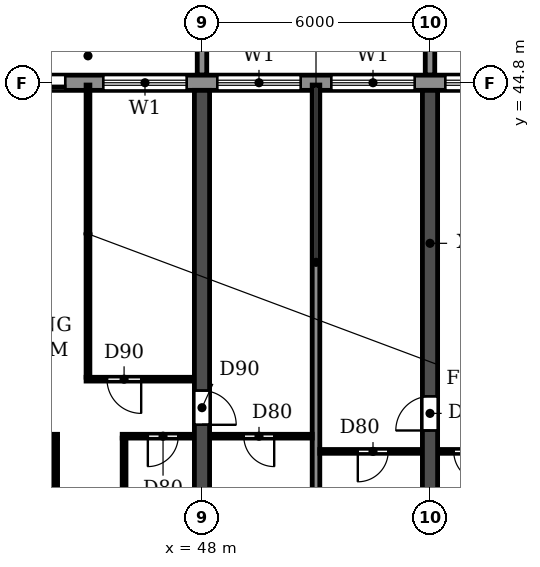
"""IFC4 building model, lengths in metres.
Left out: names, types, materials, properties, quantities, classifications, styles, units other than length and angle.
Written with IfcOpenShell. Run it as: python <this file> out.ifc"""

import sys

from ifc_helpers import new_model, si_unit, direction, frame, frame_2d, origin, place, context, subcontext, project, spatial, polyline, rectangle, outline, extrude, source, transform, mapped, element, fill, save


model = new_model("IFC4")
c1 = context("Model", 3, precision=1e-05, world=origin(), true_north=direction((0.0, 1.0)))
c2 = subcontext(c1, "Body", "Model", "MODEL_VIEW")
j1 = project(units=[si_unit("LENGTHUNIT", "METRE"), si_unit("PLANEANGLEUNIT", "RADIAN")], contexts=[c1])
p1 = place(None, origin())
s1 = spatial("IfcSite", under=j1, at=p1, CompositionType="ELEMENT")
p2 = place(p1, origin())
s2 = spatial("IfcBuilding", under=s1, at=p2, CompositionType="ELEMENT")
p3 = place(p2, frame((0.0, 0.0, 63.0)))
s3 = spatial("IfcBuildingStorey", under=s2, at=p3, CompositionType="ELEMENT", Elevation=63.0)
p4 = place(p3, frame((48.0, 30.55, 0.0), z_axis=(0.0, 0.0, 1.0), x_axis=(0.0, 1.0, 0.0)))
e1 = element("IfcWall", 1, at=p4, inside=s3, PredefinedType="SHEAR", context=c2, shape_type="SweptSolid", body=[
    extrude(rectangle(XDim=14.05, YDim=0.4, at=frame_2d((7.025, 0.0))), origin(), (0.0, 0.0, 1.0), 2.95),
])
p5 = place(p4, frame((5.25, 0.0, 0.0)))
e2 = element("IfcOpeningElement", 2, at=p5, cuts=e1, PredefinedType="OPENING", context=c2, shape_type="SweptSolid", body=[
    extrude(rectangle(XDim=0.9, YDim=2.1, at=frame_2d((0.45, 1.05))), frame((0.0, 0.21, 0.0), z_axis=(0.0, -1.0, 0.0), x_axis=(1.0, 0.0, 0.0)), (0.0, 0.0, 1.0), 0.42),
])
p6 = place(p3, frame((54.0, 30.55, 0.0), z_axis=(0.0, 0.0, 1.0), x_axis=(0.0, 1.0, 0.0)))
e3 = element("IfcWall", 3, at=p6, inside=s3, PredefinedType="SHEAR", context=c2, shape_type="SweptSolid", body=[
    extrude(rectangle(XDim=14.05, YDim=0.4, at=frame_2d((7.025, 0.0))), origin(), (0.0, 0.0, 1.0), 2.95),
])
p7 = place(p6, frame((5.1, 0.0, 0.0)))
e4 = element("IfcOpeningElement", 4, at=p7, cuts=e3, PredefinedType="OPENING", context=c2, shape_type="SweptSolid", body=[
    extrude(rectangle(XDim=0.9, YDim=2.1, at=frame_2d((0.45, 1.05))), frame((0.0, 0.21, 0.0), z_axis=(0.0, -1.0, 0.0), x_axis=(1.0, 0.0, 0.0)), (0.0, 0.0, 1.0), 0.42),
])
p8 = place(p3, frame((91.317, 44.8, 0.0), z_axis=(0.0, 0.0, 1.0), x_axis=(-1.0, 0.0, 0.0)))
e5 = element("IfcWall", 5, at=p8, inside=s3, PredefinedType="STANDARD", context=c2, shape_type="SweptSolid", body=[
    extrude(rectangle(XDim=80.634, YDim=0.4, at=frame_2d((40.317, 0.0))), origin(), (0.0, 0.0, 1.0), 2.95),
])
p9 = place(p8, frame((76.717, 0.0, 0.9)))
e6 = element("IfcOpeningElement", 6, at=p9, cuts=e5, PredefinedType="OPENING", context=c2, shape_type="SweptSolid", body=[
    extrude(rectangle(XDim=2.2, YDim=1.5, at=frame_2d((1.1, 0.75))), frame((0.0, 0.21, 0.0), z_axis=(0.0, -1.0, 0.0), x_axis=(1.0, 0.0, 0.0)), (0.0, 0.0, 1.0), 0.42),
])
p10 = place(p8, frame((73.917, 0.0, 0.0)))
e7 = element("IfcOpeningElement", 7, at=p10, cuts=e5, PredefinedType="OPENING", context=c2, shape_type="SweptSolid", body=[
    extrude(rectangle(XDim=1.8, YDim=2.4, at=frame_2d((0.9, 1.2))), frame((0.0, 0.21, 0.0), z_axis=(0.0, -1.0, 0.0), x_axis=(1.0, 0.0, 0.0)), (0.0, 0.0, 1.0), 0.42),
])
p11 = place(p8, frame((70.717, 0.0, 0.9)))
e8 = element("IfcOpeningElement", 8, at=p11, cuts=e5, PredefinedType="OPENING", context=c2, shape_type="SweptSolid", body=[
    extrude(rectangle(XDim=2.2, YDim=1.5, at=frame_2d((1.1, 0.75))), frame((0.0, 0.21, 0.0), z_axis=(0.0, -1.0, 0.0), x_axis=(1.0, 0.0, 0.0)), (0.0, 0.0, 1.0), 0.42),
])
p12 = place(p8, frame((67.917, 0.0, 0.0)))
e9 = element("IfcOpeningElement", 9, at=p12, cuts=e5, PredefinedType="OPENING", context=c2, shape_type="SweptSolid", body=[
    extrude(rectangle(XDim=1.8, YDim=2.4, at=frame_2d((0.9, 1.2))), frame((0.0, 0.21, 0.0), z_axis=(0.0, -1.0, 0.0), x_axis=(1.0, 0.0, 0.0)), (0.0, 0.0, 1.0), 0.42),
])
p13 = place(p8, frame((64.717, 0.0, 0.9)))
e10 = element("IfcOpeningElement", 10, at=p13, cuts=e5, PredefinedType="OPENING", context=c2, shape_type="SweptSolid", body=[
    extrude(rectangle(XDim=2.2, YDim=1.5, at=frame_2d((1.1, 0.75))), frame((0.0, 0.21, 0.0), z_axis=(0.0, -1.0, 0.0), x_axis=(1.0, 0.0, 0.0)), (0.0, 0.0, 1.0), 0.42),
])
p14 = place(p8, frame((61.917, 0.0, 0.0)))
e11 = element("IfcOpeningElement", 11, at=p14, cuts=e5, PredefinedType="OPENING", context=c2, shape_type="SweptSolid", body=[
    extrude(rectangle(XDim=1.8, YDim=2.4, at=frame_2d((0.9, 1.2))), frame((0.0, 0.21, 0.0), z_axis=(0.0, -1.0, 0.0), x_axis=(1.0, 0.0, 0.0)), (0.0, 0.0, 1.0), 0.42),
])
p15 = place(p8, frame((58.717, 0.0, 0.9)))
e12 = element("IfcOpeningElement", 12, at=p15, cuts=e5, PredefinedType="OPENING", context=c2, shape_type="SweptSolid", body=[
    extrude(rectangle(XDim=2.2, YDim=1.5, at=frame_2d((1.1, 0.75))), frame((0.0, 0.21, 0.0), z_axis=(0.0, -1.0, 0.0), x_axis=(1.0, 0.0, 0.0)), (0.0, 0.0, 1.0), 0.42),
])
p16 = place(p8, frame((55.717, 0.0, 0.9)))
e13 = element("IfcOpeningElement", 13, at=p16, cuts=e5, PredefinedType="OPENING", context=c2, shape_type="SweptSolid", body=[
    extrude(rectangle(XDim=2.2, YDim=1.5, at=frame_2d((1.1, 0.75))), frame((0.0, 0.21, 0.0), z_axis=(0.0, -1.0, 0.0), x_axis=(1.0, 0.0, 0.0)), (0.0, 0.0, 1.0), 0.42),
])
p17 = place(p8, frame((52.917, 0.0, 0.0)))
e14 = element("IfcOpeningElement", 14, at=p17, cuts=e5, PredefinedType="OPENING", context=c2, shape_type="SweptSolid", body=[
    extrude(rectangle(XDim=1.8, YDim=2.4, at=frame_2d((0.9, 1.2))), frame((0.0, 0.21, 0.0), z_axis=(0.0, -1.0, 0.0), x_axis=(1.0, 0.0, 0.0)), (0.0, 0.0, 1.0), 0.42),
])
p18 = place(p8, frame((49.717, 0.0, 0.9)))
e15 = element("IfcOpeningElement", 15, at=p18, cuts=e5, PredefinedType="OPENING", context=c2, shape_type="SweptSolid", body=[
    extrude(rectangle(XDim=2.2, YDim=1.5, at=frame_2d((1.1, 0.75))), frame((0.0, 0.21, 0.0), z_axis=(0.0, -1.0, 0.0), x_axis=(1.0, 0.0, 0.0)), (0.0, 0.0, 1.0), 0.42),
])
p19 = place(p8, frame((46.917, 0.0, 0.0)))
e16 = element("IfcOpeningElement", 16, at=p19, cuts=e5, PredefinedType="OPENING", context=c2, shape_type="SweptSolid", body=[
    extrude(rectangle(XDim=1.8, YDim=2.4, at=frame_2d((0.9, 1.2))), frame((0.0, 0.21, 0.0), z_axis=(0.0, -1.0, 0.0), x_axis=(1.0, 0.0, 0.0)), (0.0, 0.0, 1.0), 0.42),
])
p20 = place(p8, frame((43.717, 0.0, 0.9)))
e17 = element("IfcOpeningElement", 17, at=p20, cuts=e5, PredefinedType="OPENING", context=c2, shape_type="SweptSolid", body=[
    extrude(rectangle(XDim=2.2, YDim=1.5, at=frame_2d((1.1, 0.75))), frame((0.0, 0.21, 0.0), z_axis=(0.0, -1.0, 0.0), x_axis=(1.0, 0.0, 0.0)), (0.0, 0.0, 1.0), 0.42),
])
p21 = place(p8, frame((40.717, 0.0, 0.9)))
e18 = element("IfcOpeningElement", 18, at=p21, cuts=e5, PredefinedType="OPENING", context=c2, shape_type="SweptSolid", body=[
    extrude(rectangle(XDim=2.2, YDim=1.5, at=frame_2d((1.1, 0.75))), frame((0.0, 0.21, 0.0), z_axis=(0.0, -1.0, 0.0), x_axis=(1.0, 0.0, 0.0)), (0.0, 0.0, 1.0), 0.42),
])
p22 = place(p8, frame((37.717, 0.0, 0.9)))
e19 = element("IfcOpeningElement", 19, at=p22, cuts=e5, PredefinedType="OPENING", context=c2, shape_type="SweptSolid", body=[
    extrude(rectangle(XDim=2.2, YDim=1.5, at=frame_2d((1.1, 0.75))), frame((0.0, 0.21, 0.0), z_axis=(0.0, -1.0, 0.0), x_axis=(1.0, 0.0, 0.0)), (0.0, 0.0, 1.0), 0.42),
])
p23 = place(p8, frame((34.717, 0.0, 0.9)))
e20 = element("IfcOpeningElement", 20, at=p23, cuts=e5, PredefinedType="OPENING", context=c2, shape_type="SweptSolid", body=[
    extrude(rectangle(XDim=2.2, YDim=1.5, at=frame_2d((1.1, 0.75))), frame((0.0, 0.21, 0.0), z_axis=(0.0, -1.0, 0.0), x_axis=(1.0, 0.0, 0.0)), (0.0, 0.0, 1.0), 0.42),
])
p24 = place(p8, frame((31.917, 0.0, 0.0)))
e21 = element("IfcOpeningElement", 21, at=p24, cuts=e5, PredefinedType="OPENING", context=c2, shape_type="SweptSolid", body=[
    extrude(rectangle(XDim=1.8, YDim=2.4, at=frame_2d((0.9, 1.2))), frame((0.0, 0.21, 0.0), z_axis=(0.0, -1.0, 0.0), x_axis=(1.0, 0.0, 0.0)), (0.0, 0.0, 1.0), 0.42),
])
p25 = place(p8, frame((28.917, 0.0, 0.0)))
e22 = element("IfcOpeningElement", 22, at=p25, cuts=e5, PredefinedType="OPENING", context=c2, shape_type="SweptSolid", body=[
    extrude(rectangle(XDim=1.8, YDim=2.4, at=frame_2d((0.9, 1.2))), frame((0.0, 0.21, 0.0), z_axis=(0.0, -1.0, 0.0), x_axis=(1.0, 0.0, 0.0)), (0.0, 0.0, 1.0), 0.42),
])
p26 = place(p8, frame((25.717, 0.0, 0.9)))
e23 = element("IfcOpeningElement", 23, at=p26, cuts=e5, PredefinedType="OPENING", context=c2, shape_type="SweptSolid", body=[
    extrude(rectangle(XDim=2.2, YDim=1.5, at=frame_2d((1.1, 0.75))), frame((0.0, 0.21, 0.0), z_axis=(0.0, -1.0, 0.0), x_axis=(1.0, 0.0, 0.0)), (0.0, 0.0, 1.0), 0.42),
])
p27 = place(p8, frame((22.917, 0.0, 0.0)))
e24 = element("IfcOpeningElement", 24, at=p27, cuts=e5, PredefinedType="OPENING", context=c2, shape_type="SweptSolid", body=[
    extrude(rectangle(XDim=1.8, YDim=2.4, at=frame_2d((0.9, 1.2))), frame((0.0, 0.21, 0.0), z_axis=(0.0, -1.0, 0.0), x_axis=(1.0, 0.0, 0.0)), (0.0, 0.0, 1.0), 0.42),
])
p28 = place(p8, frame((19.717, 0.0, 0.9)))
e25 = element("IfcOpeningElement", 25, at=p28, cuts=e5, PredefinedType="OPENING", context=c2, shape_type="SweptSolid", body=[
    extrude(rectangle(XDim=2.2, YDim=1.5, at=frame_2d((1.1, 0.75))), frame((0.0, 0.21, 0.0), z_axis=(0.0, -1.0, 0.0), x_axis=(1.0, 0.0, 0.0)), (0.0, 0.0, 1.0), 0.42),
])
p29 = place(p8, frame((16.917, 0.0, 0.0)))
e26 = element("IfcOpeningElement", 26, at=p29, cuts=e5, PredefinedType="OPENING", context=c2, shape_type="SweptSolid", body=[
    extrude(rectangle(XDim=1.8, YDim=2.4, at=frame_2d((0.9, 1.2))), frame((0.0, 0.21, 0.0), z_axis=(0.0, -1.0, 0.0), x_axis=(1.0, 0.0, 0.0)), (0.0, 0.0, 1.0), 0.42),
])
p30 = place(p8, frame((13.717, 0.0, 0.9)))
e27 = element("IfcOpeningElement", 27, at=p30, cuts=e5, PredefinedType="OPENING", context=c2, shape_type="SweptSolid", body=[
    extrude(rectangle(XDim=2.2, YDim=1.5, at=frame_2d((1.1, 0.75))), frame((0.0, 0.21, 0.0), z_axis=(0.0, -1.0, 0.0), x_axis=(1.0, 0.0, 0.0)), (0.0, 0.0, 1.0), 0.42),
])
p31 = place(p8, frame((10.917, 0.0, 0.0)))
e28 = element("IfcOpeningElement", 28, at=p31, cuts=e5, PredefinedType="OPENING", context=c2, shape_type="SweptSolid", body=[
    extrude(rectangle(XDim=1.8, YDim=2.4, at=frame_2d((0.9, 1.2))), frame((0.0, 0.21, 0.0), z_axis=(0.0, -1.0, 0.0), x_axis=(1.0, 0.0, 0.0)), (0.0, 0.0, 1.0), 0.42),
])
p32 = place(p8, frame((7.717, 0.0, 0.9)))
e29 = element("IfcOpeningElement", 29, at=p32, cuts=e5, PredefinedType="OPENING", context=c2, shape_type="SweptSolid", body=[
    extrude(rectangle(XDim=2.2, YDim=1.5, at=frame_2d((1.1, 0.75))), frame((0.0, 0.21, 0.0), z_axis=(0.0, -1.0, 0.0), x_axis=(1.0, 0.0, 0.0)), (0.0, 0.0, 1.0), 0.42),
])
p33 = place(p8, frame((4.717, 0.0, 0.9)))
e30 = element("IfcOpeningElement", 30, at=p33, cuts=e5, PredefinedType="OPENING", context=c2, shape_type="SweptSolid", body=[
    extrude(rectangle(XDim=2.2, YDim=1.5, at=frame_2d((1.1, 0.75))), frame((0.0, 0.21, 0.0), z_axis=(0.0, -1.0, 0.0), x_axis=(1.0, 0.0, 0.0)), (0.0, 0.0, 1.0), 0.42),
])
p34 = place(p8, frame((1.717, 0.0, 0.9)))
e31 = element("IfcOpeningElement", 31, at=p34, cuts=e5, PredefinedType="OPENING", context=c2, shape_type="SweptSolid", body=[
    extrude(rectangle(XDim=2.2, YDim=1.5, at=frame_2d((1.1, 0.75))), frame((0.0, 0.21, 0.0), z_axis=(0.0, -1.0, 0.0), x_axis=(1.0, 0.0, 0.0)), (0.0, 0.0, 1.0), 0.42),
])
m1 = source(origin(), c2, "Body", "SweptSolid", [
    extrude(outline(polyline([(0.0, 0.0), (0.25, 0.0), (0.25, 3.1), (0.0, 3.1), (0.0, 0.0)])), origin(), (0.0, 0.0, 1.0), 3.1),
])
for number, where in (
    (32, (47.875, 45.0, 0.0)),
    (33, (53.875, 45.0, 0.0)),
):
    element("IfcWall", number, at=place(p3, frame(where)), inside=s3, PredefinedType="STANDARD", context=c2, shape_type="MappedRepresentation", body=[
        mapped(m1, transform((0.0, 0.0, 0.0))),
    ])
p35 = place(p3, frame((51.0, 30.56, 0.0), z_axis=(0.0, 0.0, 1.0), x_axis=(0.0, 1.0, 0.0)))
e34 = element("IfcWall", 34, at=p35, inside=s3, PredefinedType="PARTITIONING", context=c2, shape_type="SweptSolid", body=[
    extrude(rectangle(XDim=14.18, YDim=0.2, at=frame_2d((7.09, 0.0))), origin(), (0.0, 0.0, 1.0), 2.95),
])
p36 = place(p3, frame((51.1, 35.1, 0.0), z_axis=(0.0, 0.0, 1.0), x_axis=(1.0, 0.0, 0.0)))
e35 = element("IfcWall", 35, at=p36, inside=s3, PredefinedType="PARTITIONING", context=c2, shape_type="SweptSolid", body=[
    extrude(rectangle(XDim=2.69, YDim=0.1, at=frame_2d((1.345, 0.0))), origin(), (0.0, 0.0, 1.0), 2.95),
])
p37 = place(p36, frame((1.0, 0.0, 0.0)))
e36 = element("IfcOpeningElement", 36, at=p37, cuts=e35, PredefinedType="OPENING", context=c2, shape_type="SweptSolid", body=[
    extrude(rectangle(XDim=0.8, YDim=2.1, at=frame_2d((0.4, 1.05))), frame((0.0, 0.06, 0.0), z_axis=(0.0, -1.0, 0.0), x_axis=(1.0, 0.0, 0.0)), (0.0, 0.0, 1.0), 0.12),
])
p38 = place(p3, frame((54.21, 35.1, 0.0), z_axis=(0.0, 0.0, 1.0), x_axis=(1.0, 0.0, 0.0)))
e37 = element("IfcWall", 37, at=p38, inside=s3, PredefinedType="PARTITIONING", context=c2, shape_type="SweptSolid", body=[
    extrude(rectangle(XDim=1.89, YDim=0.1, at=frame_2d((0.945, 0.0))), origin(), (0.0, 0.0, 1.0), 2.95),
])
p39 = place(p38, frame((0.415, 0.0, 0.0)))
e38 = element("IfcOpeningElement", 38, at=p39, cuts=e37, PredefinedType="OPENING", context=c2, shape_type="SweptSolid", body=[
    extrude(rectangle(XDim=0.8, YDim=2.1, at=frame_2d((0.4, 1.05))), frame((0.0, 0.06, 0.0), z_axis=(0.0, -1.0, 0.0), x_axis=(1.0, 0.0, 0.0)), (0.0, 0.0, 1.0), 0.12),
])
p40 = place(p3, frame((42.21, 35.5, 0.0), z_axis=(0.0, 0.0, 1.0), x_axis=(1.0, 0.0, 0.0)))
e39 = element("IfcWall", 39, at=p40, inside=s3, PredefinedType="PARTITIONING", context=c2, shape_type="SweptSolid", body=[
    extrude(rectangle(XDim=1.99, YDim=0.1, at=frame_2d((0.995, 0.0))), origin(), (0.0, 0.0, 1.0), 2.95),
])
p41 = place(p40, frame((0.415, 0.0, 0.0)))
e40 = element("IfcOpeningElement", 40, at=p41, cuts=e39, PredefinedType="OPENING", context=c2, shape_type="SweptSolid", body=[
    extrude(rectangle(XDim=0.9, YDim=2.1, at=frame_2d((0.45, 1.05))), frame((0.0, 0.06, 0.0), z_axis=(0.0, -1.0, 0.0), x_axis=(1.0, 0.0, 0.0)), (0.0, 0.0, 1.0), 0.12),
])
p42 = place(p3, frame((45.9, 35.5, 0.0), z_axis=(0.0, 0.0, 1.0), x_axis=(1.0, 0.0, 0.0)))
e41 = element("IfcWall", 41, at=p42, inside=s3, PredefinedType="PARTITIONING", context=c2, shape_type="SweptSolid", body=[
    extrude(rectangle(XDim=1.89, YDim=0.1, at=frame_2d((0.945, 0.0))), origin(), (0.0, 0.0, 1.0), 2.95),
])
p43 = place(p42, frame((0.675, 0.0, 0.0)))
e42 = element("IfcOpeningElement", 42, at=p43, cuts=e41, PredefinedType="OPENING", context=c2, shape_type="SweptSolid", body=[
    extrude(rectangle(XDim=0.8, YDim=2.1, at=frame_2d((0.4, 1.05))), frame((0.0, 0.06, 0.0), z_axis=(0.0, -1.0, 0.0), x_axis=(1.0, 0.0, 0.0)), (0.0, 0.0, 1.0), 0.12),
])
p44 = place(p3, frame((48.21, 35.5, 0.0), z_axis=(0.0, 0.0, 1.0), x_axis=(1.0, 0.0, 0.0)))
e43 = element("IfcWall", 43, at=p44, inside=s3, PredefinedType="PARTITIONING", context=c2, shape_type="SweptSolid", body=[
    extrude(rectangle(XDim=2.69, YDim=0.1, at=frame_2d((1.345, 0.0))), origin(), (0.0, 0.0, 1.0), 2.95),
])
p45 = place(p44, frame((0.89, 0.0, 0.0)))
e44 = element("IfcOpeningElement", 44, at=p45, cuts=e43, PredefinedType="OPENING", context=c2, shape_type="SweptSolid", body=[
    extrude(rectangle(XDim=0.8, YDim=2.1, at=frame_2d((0.4, 1.05))), frame((0.0, 0.06, 0.0), z_axis=(0.0, -1.0, 0.0), x_axis=(1.0, 0.0, 0.0)), (0.0, 0.0, 1.0), 0.12),
])
p46 = place(p3, frame((44.95, 37.0, 0.0), z_axis=(0.0, 0.0, 1.0), x_axis=(1.0, 0.0, 0.0)))
e45 = element("IfcWall", 45, at=p46, inside=s3, PredefinedType="PARTITIONING", context=c2, shape_type="SweptSolid", body=[
    extrude(rectangle(XDim=2.84, YDim=0.1, at=frame_2d((1.42, 0.0))), origin(), (0.0, 0.0, 1.0), 2.95),
])
p47 = place(p46, frame((0.55, 0.0, 0.0)))
e46 = element("IfcOpeningElement", 46, at=p47, cuts=e45, PredefinedType="OPENING", context=c2, shape_type="SweptSolid", body=[
    extrude(rectangle(XDim=0.9, YDim=2.1, at=frame_2d((0.45, 1.05))), frame((0.0, 0.06, 0.0), z_axis=(0.0, -1.0, 0.0), x_axis=(1.0, 0.0, 0.0)), (0.0, 0.0, 1.0), 0.12),
])
p48 = place(p3, frame((44.15, 30.56, 0.0), z_axis=(0.0, 0.0, 1.0), x_axis=(0.0, 1.0, 0.0)))
e47 = element("IfcWall", 47, at=p48, inside=s3, PredefinedType="PARTITIONING", context=c2, shape_type="SweptSolid", body=[
    extrude(rectangle(XDim=4.89, YDim=0.1, at=frame_2d((2.445, 0.0))), origin(), (0.0, 0.0, 1.0), 2.95),
])
p49 = place(p3, frame((45.0, 37.05, 0.0), z_axis=(0.0, 0.0, 1.0), x_axis=(0.0, 1.0, 0.0)))
e48 = element("IfcWall", 48, at=p49, inside=s3, PredefinedType="PARTITIONING", context=c2, shape_type="SweptSolid", body=[
    extrude(rectangle(XDim=7.69, YDim=0.1, at=frame_2d((3.845, 0.0))), origin(), (0.0, 0.0, 1.0), 2.95),
])
p50 = place(p3, frame((45.95, 30.56, 0.0), z_axis=(0.0, 0.0, 1.0), x_axis=(0.0, 1.0, 0.0)))
e49 = element("IfcWall", 49, at=p50, inside=s3, PredefinedType="PARTITIONING", context=c2, shape_type="SweptSolid", body=[
    extrude(rectangle(XDim=4.89, YDim=0.1, at=frame_2d((2.445, 0.0))), origin(), (0.0, 0.0, 1.0), 2.95),
])
p51 = place(p19, origin())
e50 = element("IfcDoor", 50, at=p51, inside=s3, OperationType="DOUBLE_DOOR_SLIDING", PredefinedType="DOOR", context=c2, shape_type="SweptSolid", body=[
    extrude(rectangle(XDim=1.8, YDim=2.4, at=frame_2d((0.9, 1.2))), frame((0.0, 0.025, 0.0), z_axis=(0.0, -1.0, 0.0), x_axis=(1.0, 0.0, 0.0)), (0.0, 0.0, 1.0), 0.05),
])
fill(e16, e50)
p52 = place(p20, origin())
e51 = element("IfcWindow", 51, at=p52, inside=s3, PartitioningType="DOUBLE_PANEL_HORIZONTAL", PredefinedType="WINDOW", context=c2, shape_type="SweptSolid", body=[
    extrude(rectangle(XDim=2.2, YDim=1.5, at=frame_2d((1.1, 0.75))), frame((0.0, 0.03, 0.0), z_axis=(0.0, -1.0, 0.0), x_axis=(1.0, 0.0, 0.0)), (0.0, 0.0, 1.0), 0.06),
])
fill(e17, e51)
p53 = place(p21, origin())
e52 = element("IfcWindow", 52, at=p53, inside=s3, PartitioningType="DOUBLE_PANEL_HORIZONTAL", PredefinedType="WINDOW", context=c2, shape_type="SweptSolid", body=[
    extrude(rectangle(XDim=2.2, YDim=1.5, at=frame_2d((1.1, 0.75))), frame((0.0, 0.03, 0.0), z_axis=(0.0, -1.0, 0.0), x_axis=(1.0, 0.0, 0.0)), (0.0, 0.0, 1.0), 0.06),
])
fill(e18, e52)
p54 = place(p22, origin())
e53 = element("IfcWindow", 53, at=p54, inside=s3, PartitioningType="DOUBLE_PANEL_HORIZONTAL", PredefinedType="WINDOW", context=c2, shape_type="SweptSolid", body=[
    extrude(rectangle(XDim=2.2, YDim=1.5, at=frame_2d((1.1, 0.75))), frame((0.0, 0.03, 0.0), z_axis=(0.0, -1.0, 0.0), x_axis=(1.0, 0.0, 0.0)), (0.0, 0.0, 1.0), 0.06),
])
fill(e19, e53)
p55 = place(p23, origin())
e54 = element("IfcWindow", 54, at=p55, inside=s3, PartitioningType="DOUBLE_PANEL_HORIZONTAL", PredefinedType="WINDOW", context=c2, shape_type="SweptSolid", body=[
    extrude(rectangle(XDim=2.2, YDim=1.5, at=frame_2d((1.1, 0.75))), frame((0.0, 0.03, 0.0), z_axis=(0.0, -1.0, 0.0), x_axis=(1.0, 0.0, 0.0)), (0.0, 0.0, 1.0), 0.06),
])
fill(e20, e54)
p56 = place(p45, frame((0.8, 0.0, 0.0), z_axis=(0.0, 0.0, 1.0), x_axis=(-1.0, 0.0, 0.0)))
e55 = element("IfcDoor", 55, at=p56, inside=s3, OperationType="SINGLE_SWING_LEFT", PredefinedType="DOOR", context=c2, shape_type="SweptSolid", body=[
    extrude(rectangle(XDim=0.8, YDim=2.1, at=frame_2d((0.4, 1.05))), frame((0.0, 0.025, 0.0), z_axis=(0.0, -1.0, 0.0), x_axis=(1.0, 0.0, 0.0)), (0.0, 0.0, 1.0), 0.05),
])
fill(e44, e55)
p57 = place(p47, frame((0.9, 0.0, 0.0), z_axis=(0.0, 0.0, 1.0), x_axis=(-1.0, 0.0, 0.0)))
e56 = element("IfcDoor", 56, at=p57, inside=s3, OperationType="SINGLE_SWING_LEFT", PredefinedType="DOOR", context=c2, shape_type="SweptSolid", body=[
    extrude(rectangle(XDim=0.9, YDim=2.1, at=frame_2d((0.45, 1.05))), frame((0.0, 0.025, 0.0), z_axis=(0.0, -1.0, 0.0), x_axis=(1.0, 0.0, 0.0)), (0.0, 0.0, 1.0), 0.05),
])
fill(e46, e56)
p58 = place(p43, frame((0.8, 0.0, 0.0), z_axis=(0.0, 0.0, 1.0), x_axis=(-1.0, 0.0, 0.0)))
e57 = element("IfcDoor", 57, at=p58, inside=s3, OperationType="SINGLE_SWING_RIGHT", PredefinedType="DOOR", context=c2, shape_type="SweptSolid", body=[
    extrude(rectangle(XDim=0.8, YDim=2.1, at=frame_2d((0.4, 1.05))), frame((0.0, 0.025, 0.0), z_axis=(0.0, -1.0, 0.0), x_axis=(1.0, 0.0, 0.0)), (0.0, 0.0, 1.0), 0.05),
])
fill(e42, e57)
p59 = place(p5, frame((0.9, 0.0, 0.0), z_axis=(0.0, 0.0, 1.0), x_axis=(-1.0, 0.0, 0.0)))
e58 = element("IfcDoor", 58, at=p59, inside=s3, OperationType="SINGLE_SWING_RIGHT", PredefinedType="DOOR", context=c2, shape_type="SweptSolid", body=[
    extrude(rectangle(XDim=0.9, YDim=2.1, at=frame_2d((0.45, 1.05))), frame((0.0, 0.025, 0.0), z_axis=(0.0, -1.0, 0.0), x_axis=(1.0, 0.0, 0.0)), (0.0, 0.0, 1.0), 0.05),
])
fill(e2, e58)
p60 = place(p37, frame((0.8, 0.0, 0.0), z_axis=(0.0, 0.0, 1.0), x_axis=(-1.0, 0.0, 0.0)))
e59 = element("IfcDoor", 59, at=p60, inside=s3, OperationType="SINGLE_SWING_RIGHT", PredefinedType="DOOR", context=c2, shape_type="SweptSolid", body=[
    extrude(rectangle(XDim=0.8, YDim=2.1, at=frame_2d((0.4, 1.05))), frame((0.0, 0.025, 0.0), z_axis=(0.0, -1.0, 0.0), x_axis=(1.0, 0.0, 0.0)), (0.0, 0.0, 1.0), 0.05),
])
fill(e36, e59)
p61 = place(p7, origin())
e60 = element("IfcDoor", 60, at=p61, inside=s3, OperationType="SINGLE_SWING_LEFT", PredefinedType="DOOR", context=c2, shape_type="SweptSolid", body=[
    extrude(rectangle(XDim=0.9, YDim=2.1, at=frame_2d((0.45, 1.05))), frame((0.0, 0.025, 0.0), z_axis=(0.0, -1.0, 0.0), x_axis=(1.0, 0.0, 0.0)), (0.0, 0.0, 1.0), 0.05),
])
fill(e4, e60)
p62 = place(p39, frame((0.8, 0.0, 0.0), z_axis=(0.0, 0.0, 1.0), x_axis=(-1.0, 0.0, 0.0)))
e61 = element("IfcDoor", 61, at=p62, inside=s3, OperationType="SINGLE_SWING_LEFT", PredefinedType="DOOR", context=c2, shape_type="SweptSolid", body=[
    extrude(rectangle(XDim=0.8, YDim=2.1, at=frame_2d((0.4, 1.05))), frame((0.0, 0.025, 0.0), z_axis=(0.0, -1.0, 0.0), x_axis=(1.0, 0.0, 0.0)), (0.0, 0.0, 1.0), 0.05),
])
fill(e38, e61)
save(model, sys.argv[1])
